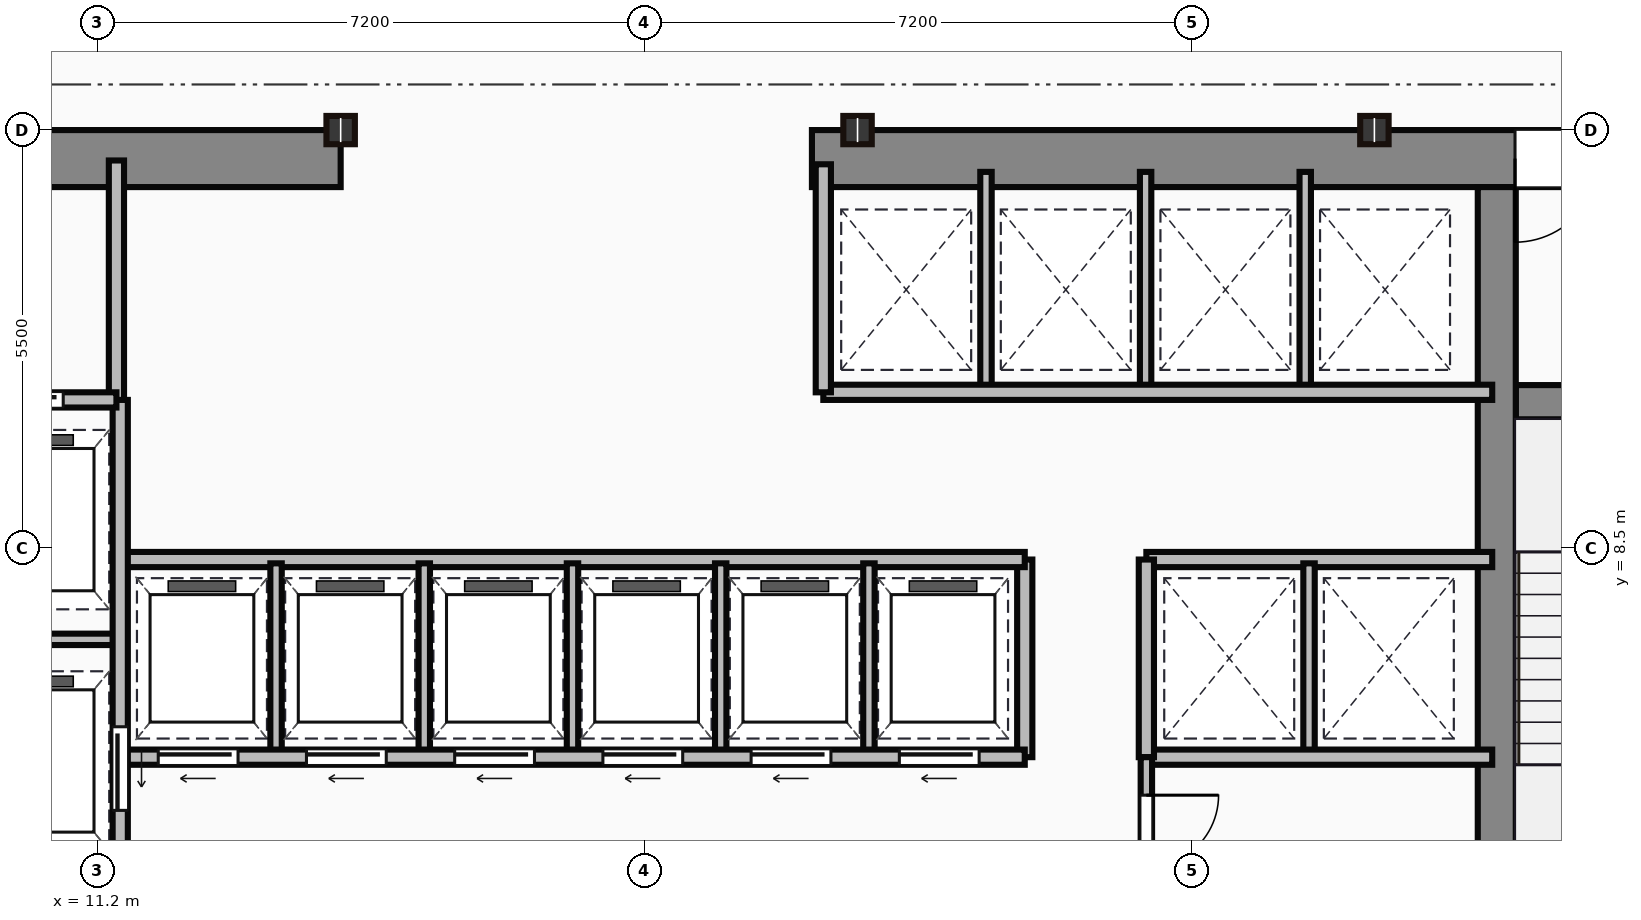
"""IFC4 building model, lengths in metres.
Left out: names, types, materials, properties, quantities, classifications, styles, units other than length and angle.
Written with IfcOpenShell. Run it as: python <this file> out.ifc"""

import sys

from ifc_helpers import new_model, si_unit, direction, frame, frame_2d, origin, origin_2d, place, context, subcontext, project, spatial, rectangle, i_section, extrude, source, transform, mapped, element, fill, save


model = new_model("IFC4")
c1 = context("Model", 3, precision=1e-05, world=origin(), true_north=direction((0.0, 1.0)))
c2 = subcontext(c1, "Body", "Model", "MODEL_VIEW")
j1 = project(units=[si_unit("LENGTHUNIT", "METRE"), si_unit("PLANEANGLEUNIT", "RADIAN")], contexts=[c1])
p1 = place(None, origin())
s1 = spatial("IfcSite", under=j1, at=p1, CompositionType="ELEMENT")
p2 = place(p1, origin())
s2 = spatial("IfcBuilding", under=s1, at=p2, CompositionType="ELEMENT")
p3 = place(p2, frame((0.0, 0.0, 173.45)))
s3 = spatial("IfcBuildingStorey", under=s2, at=p3, CompositionType="ELEMENT", Elevation=173.45)
m1 = source(origin(), c2, "Body", "SweptSolid", [
    extrude(rectangle(XDim=9.1, YDim=0.75, at=frame_2d((4.55, 0.0))), origin(), (0.0, 0.0, 1.0), 3.65),
])
p4 = place(p3, frame((5.3, 13.625, 0.0), z_axis=(0.0, 0.0, 1.0), x_axis=(1.0, 0.0, 0.0)))
e1 = element("IfcWall", 1, at=p4, inside=s3, PredefinedType="SHEAR", context=c2, shape_type="MappedRepresentation", body=[
    mapped(m1, transform((0.0, 0.0, 0.0))),
])
p5 = place(p4, frame((4.1, 0.0, 0.0)))
e2 = element("IfcOpeningElement", 2, at=p5, cuts=e1, PredefinedType="OPENING", context=c2, shape_type="SweptSolid", body=[
    extrude(rectangle(XDim=1.1, YDim=2.15, at=frame_2d((0.55, 1.075))), frame((0.0, 0.385, 0.0), z_axis=(0.0, -1.0, 0.0), x_axis=(1.0, 0.0, 0.0)), (0.0, 0.0, 1.0), 0.77),
])
m2 = source(origin(), c2, "Body", "SweptSolid", [
    extrude(rectangle(XDim=12.6, YDim=0.75, at=frame_2d((6.3, 0.0))), origin(), (0.0, 0.0, 1.0), 3.65),
])
p6 = place(p3, frame((20.6, 13.625, 0.0), z_axis=(0.0, 0.0, 1.0), x_axis=(1.0, 0.0, 0.0)))
e3 = element("IfcWall", 3, at=p6, inside=s3, PredefinedType="SHEAR", context=c2, shape_type="MappedRepresentation", body=[
    mapped(m2, transform((0.0, 0.0, 0.0))),
])
p7 = place(p6, frame((9.25, 0.0, 0.0)))
e4 = element("IfcOpeningElement", 4, at=p7, cuts=e3, PredefinedType="OPENING", context=c2, shape_type="SweptSolid", body=[
    extrude(rectangle(XDim=1.1, YDim=2.15, at=frame_2d((0.55, 1.075))), frame((0.0, 0.385, 0.0), z_axis=(0.0, -1.0, 0.0), x_axis=(1.0, 0.0, 0.0)), (0.0, 0.0, 1.0), 0.77),
])
m3 = source(origin(), c2, "Body", "SweptSolid", [
    extrude(rectangle(XDim=12.35, YDim=0.5, at=frame_2d((6.175, 0.0))), origin(), (0.0, 0.0, 1.0), 3.65),
])
p8 = place(p3, frame((29.61, 0.9, 0.0), z_axis=(0.0, 0.0, 1.0), x_axis=(0.0, 1.0, 0.0)))
e5 = element("IfcWall", 5, at=p8, inside=s3, PredefinedType="SHEAR", context=c2, shape_type="MappedRepresentation", body=[
    mapped(m3, transform((0.0, 0.0, 0.0))),
])
m4 = source(origin(), c2, "Body", "SweptSolid", [
    extrude(rectangle(XDim=3.39, YDim=0.45, at=frame_2d((1.695, 0.0))), origin(), (0.0, 0.0, 1.0), 3.65),
])
p9 = place(p3, frame((29.86, 10.42, 0.0), z_axis=(0.0, 0.0, 1.0), x_axis=(1.0, 0.0, 0.0)))
e6 = element("IfcWall", 6, at=p9, inside=s3, PredefinedType="SHEAR", context=c2, shape_type="MappedRepresentation", body=[
    mapped(m4, transform((0.0, 0.0, 0.0))),
])
p10 = place(p9, frame((1.1, 0.0, 0.0)))
e7 = element("IfcOpeningElement", 7, at=p10, cuts=e6, PredefinedType="OPENING", context=c2, shape_type="SweptSolid", body=[
    extrude(rectangle(XDim=1.1, YDim=2.15, at=frame_2d((0.55, 1.075))), frame((0.0, 0.235, 0.0), z_axis=(0.0, -1.0, 0.0), x_axis=(1.0, 0.0, 0.0)), (0.0, 0.0, 1.0), 0.47),
])
m5 = source(origin(), c2, "Body", "SweptSolid", [
    extrude(i_section(OverallWidth=0.374, OverallDepth=0.372, WebThickness=0.016, FlangeThickness=0.026, at=origin_2d()), origin(), (0.0, 0.0, 1.0), 3.65),
])
for number, where, z_axis, x_axis in (
    (8, (14.4, 14.0, 0.0), (0.0, 0.0, 1.0), (1.0, 0.0, 0.0)),
    (9, (21.2, 14.0, 0.0), (0.0, 0.0, 1.0), (1.0, 0.0, 0.0)),
    (10, (28.0, 14.0, 0.0), (0.0, 0.0, 1.0), (1.0, 0.0, 0.0)),
):
    element("IfcColumn", number, at=place(p3, frame(where, z_axis=z_axis, x_axis=x_axis)), inside=s3, PredefinedType="COLUMN", context=c2, shape_type="MappedRepresentation", body=[
        mapped(m5, transform((0.0, 0.0, 0.0))),
    ])
m6 = source(origin(), c2, "Body", "SweptSolid", [
    extrude(rectangle(XDim=3.18, YDim=0.2, at=frame_2d((1.59, 0.0))), origin(), (0.0, 0.0, 1.0), 3.4),
])
p11 = place(p3, frame((11.45, 10.42, 0.0), z_axis=(0.0, 0.0, 1.0), x_axis=(0.0, 1.0, 0.0)))
e11 = element("IfcWall", 11, at=p11, inside=s3, PredefinedType="PARTITIONING", context=c2, shape_type="MappedRepresentation", body=[
    mapped(m6, transform((0.0, 0.0, 0.0))),
])
m7 = source(origin(), c2, "Body", "SweptSolid", [
    extrude(rectangle(XDim=2.35, YDim=0.2, at=frame_2d((1.175, 0.0))), origin(), (0.0, 0.0, 1.0), 3.4),
])
p12 = place(p3, frame((9.1, 10.45, 0.0), z_axis=(0.0, 0.0, 1.0), x_axis=(1.0, 0.0, 0.0)))
e12 = element("IfcWall", 12, at=p12, inside=s3, PredefinedType="PARTITIONING", context=c2, shape_type="MappedRepresentation", body=[
    mapped(m7, transform((0.0, 0.0, 0.0))),
])
p13 = place(p12, frame((0.55, 0.0, 0.0)))
e13 = element("IfcOpeningElement", 13, at=p13, cuts=e12, PredefinedType="OPENING", context=c2, shape_type="SweptSolid", body=[
    extrude(rectangle(XDim=1.1, YDim=2.15, at=frame_2d((0.55, 1.075))), frame((0.0, 0.11, 0.0), z_axis=(0.0, -1.0, 0.0), x_axis=(1.0, 0.0, 0.0)), (0.0, 0.0, 1.0), 0.22),
])
m8 = source(origin(), c2, "Body", "SweptSolid", [
    extrude(rectangle(XDim=9.6, YDim=0.2, at=frame_2d((4.8, 0.0))), origin(), (0.0, 0.0, 1.0), 3.4),
])
p14 = place(p3, frame((11.5, 0.85, 0.0), z_axis=(0.0, 0.0, 1.0), x_axis=(0.0, 1.0, 0.0)))
e14 = element("IfcWall", 14, at=p14, inside=s3, PredefinedType="PARTITIONING", context=c2, shape_type="MappedRepresentation", body=[
    mapped(m8, transform((0.0, 0.0, 0.0))),
])
p15 = place(p14, frame((4.2, 0.0, 0.0)))
e15 = element("IfcOpeningElement", 15, at=p15, cuts=e14, PredefinedType="OPENING", context=c2, shape_type="SweptSolid", body=[
    extrude(rectangle(XDim=1.1, YDim=2.15, at=frame_2d((0.55, 1.075))), frame((0.0, 0.11, 0.0), z_axis=(0.0, -1.0, 0.0), x_axis=(1.0, 0.0, 0.0)), (0.0, 0.0, 1.0), 0.22),
])
p16 = place(p14, frame((0.9, 0.0, 0.0)))
e16 = element("IfcOpeningElement", 16, at=p16, cuts=e14, PredefinedType="OPENING", context=c2, shape_type="SweptSolid", body=[
    extrude(rectangle(XDim=1.2, YDim=2.15, at=frame_2d((0.6, 1.075))), frame((0.0, 0.11, 0.0), z_axis=(0.0, -1.0, 0.0), x_axis=(1.0, 0.0, 0.0)), (0.0, 0.0, 1.0), 0.22),
])
m9 = source(origin(), c2, "Body", "SweptSolid", [
    extrude(rectangle(XDim=2.4, YDim=0.15, at=frame_2d((1.2, 0.0))), origin(), (0.0, 0.0, 1.0), 3.4),
])
p17 = place(p3, frame((9.1, 7.3, 0.0), z_axis=(0.0, 0.0, 1.0), x_axis=(1.0, 0.0, 0.0)))
e17 = element("IfcWall", 17, at=p17, inside=s3, PredefinedType="PARTITIONING", context=c2, shape_type="MappedRepresentation", body=[
    mapped(m9, transform((0.0, 0.0, 0.0))),
])
m10 = source(origin(), c2, "Body", "SweptSolid", [
    extrude(rectangle(XDim=11.85, YDim=0.2, at=frame_2d((5.925, 0.0))), origin(), (0.0, 0.0, 1.0), 3.4),
])
p18 = place(p3, frame((11.55, 5.75, 0.0), z_axis=(0.0, 0.0, 1.0), x_axis=(1.0, 0.0, 0.0)))
e18 = element("IfcWall", 18, at=p18, inside=s3, PredefinedType="PARTITIONING", context=c2, shape_type="MappedRepresentation", body=[
    mapped(m10, transform((0.0, 0.0, 0.0))),
])
p19 = place(p18, frame((0.45, 0.0, 0.0)))
e19 = element("IfcOpeningElement", 19, at=p19, cuts=e18, PredefinedType="OPENING", context=c2, shape_type="SweptSolid", body=[
    extrude(rectangle(XDim=1.05, YDim=2.15, at=frame_2d((0.525, 1.075))), frame((0.0, 0.11, 0.0), z_axis=(0.0, -1.0, 0.0), x_axis=(1.0, 0.0, 0.0)), (0.0, 0.0, 1.0), 0.22),
])
p20 = place(p18, frame((2.4, 0.0, 0.0)))
e20 = element("IfcOpeningElement", 20, at=p20, cuts=e18, PredefinedType="OPENING", context=c2, shape_type="SweptSolid", body=[
    extrude(rectangle(XDim=1.05, YDim=2.15, at=frame_2d((0.525, 1.075))), frame((0.0, 0.11, 0.0), z_axis=(0.0, -1.0, 0.0), x_axis=(1.0, 0.0, 0.0)), (0.0, 0.0, 1.0), 0.22),
])
p21 = place(p18, frame((4.35, 0.0, 0.0)))
e21 = element("IfcOpeningElement", 21, at=p21, cuts=e18, PredefinedType="OPENING", context=c2, shape_type="SweptSolid", body=[
    extrude(rectangle(XDim=1.05, YDim=2.15, at=frame_2d((0.525, 1.075))), frame((0.0, 0.11, 0.0), z_axis=(0.0, -1.0, 0.0), x_axis=(1.0, 0.0, 0.0)), (0.0, 0.0, 1.0), 0.22),
])
p22 = place(p18, frame((6.3, 0.0, 0.0)))
e22 = element("IfcOpeningElement", 22, at=p22, cuts=e18, PredefinedType="OPENING", context=c2, shape_type="SweptSolid", body=[
    extrude(rectangle(XDim=1.05, YDim=2.15, at=frame_2d((0.525, 1.075))), frame((0.0, 0.11, 0.0), z_axis=(0.0, -1.0, 0.0), x_axis=(1.0, 0.0, 0.0)), (0.0, 0.0, 1.0), 0.22),
])
p23 = place(p18, frame((8.25, 0.0, 0.0)))
e23 = element("IfcOpeningElement", 23, at=p23, cuts=e18, PredefinedType="OPENING", context=c2, shape_type="SweptSolid", body=[
    extrude(rectangle(XDim=1.05, YDim=2.15, at=frame_2d((0.525, 1.075))), frame((0.0, 0.11, 0.0), z_axis=(0.0, -1.0, 0.0), x_axis=(1.0, 0.0, 0.0)), (0.0, 0.0, 1.0), 0.22),
])
p24 = place(p18, frame((10.2, 0.0, 0.0)))
e24 = element("IfcOpeningElement", 24, at=p24, cuts=e18, PredefinedType="OPENING", context=c2, shape_type="SweptSolid", body=[
    extrude(rectangle(XDim=1.05, YDim=2.15, at=frame_2d((0.525, 1.075))), frame((0.0, 0.11, 0.0), z_axis=(0.0, -1.0, 0.0), x_axis=(1.0, 0.0, 0.0)), (0.0, 0.0, 1.0), 0.22),
])
p25 = place(p3, frame((11.55, 8.35, 0.0), z_axis=(0.0, 0.0, 1.0), x_axis=(1.0, 0.0, 0.0)))
e25 = element("IfcWall", 25, at=p25, inside=s3, PredefinedType="PARTITIONING", context=c2, shape_type="MappedRepresentation", body=[
    mapped(m10, transform((0.0, 0.0, 0.0))),
])
m11 = source(origin(), c2, "Body", "SweptSolid", [
    extrude(rectangle(XDim=2.6, YDim=0.2, at=frame_2d((1.3, 0.0))), origin(), (0.0, 0.0, 1.0), 3.4),
])
p26 = place(p3, frame((23.4, 5.75, 0.0), z_axis=(0.0, 0.0, 1.0), x_axis=(0.0, 1.0, 0.0)))
e26 = element("IfcWall", 26, at=p26, inside=s3, PredefinedType="PARTITIONING", context=c2, shape_type="MappedRepresentation", body=[
    mapped(m11, transform((0.0, 0.0, 0.0))),
])
m12 = source(origin(), c2, "Body", "SweptSolid", [
    extrude(rectangle(XDim=2.5, YDim=0.15, at=frame_2d((1.25, 0.0))), origin(), (0.0, 0.0, 1.0), 3.4),
])
for number, where, z_axis, x_axis in (
    (27, (13.55, 5.8, 0.0), (0.0, 0.0, 1.0), (0.0, 1.0, 0.0)),
    (28, (15.5, 5.8, 0.0), (0.0, 0.0, 1.0), (0.0, 1.0, 0.0)),
    (29, (17.45, 5.8, 0.0), (0.0, 0.0, 1.0), (0.0, 1.0, 0.0)),
    (30, (19.4, 5.8, 0.0), (0.0, 0.0, 1.0), (0.0, 1.0, 0.0)),
    (31, (21.35, 5.8, 0.0), (0.0, 0.0, 1.0), (0.0, 1.0, 0.0)),
):
    element("IfcWall", number, at=place(p3, frame(where, z_axis=z_axis, x_axis=x_axis)), inside=s3, PredefinedType="PARTITIONING", context=c2, shape_type="MappedRepresentation", body=[
        mapped(m12, transform((0.0, 0.0, 0.0))),
    ])
m13 = source(origin(), c2, "Body", "SweptSolid", [
    extrude(rectangle(XDim=8.8, YDim=0.2, at=frame_2d((4.4, 0.0))), origin(), (0.0, 0.0, 1.0), 3.4),
])
p27 = place(p3, frame((20.75, 10.55, 0.0), z_axis=(0.0, 0.0, 1.0), x_axis=(1.0, 0.0, 0.0)))
e32 = element("IfcWall", 32, at=p27, inside=s3, PredefinedType="PARTITIONING", context=c2, shape_type="MappedRepresentation", body=[
    mapped(m13, transform((0.0, 0.0, 0.0))),
])
m14 = source(origin(), c2, "Body", "SweptSolid", [
    extrude(rectangle(XDim=3.0, YDim=0.2, at=frame_2d((1.5, 0.0))), origin(), (0.0, 0.0, 1.0), 3.4),
])
p28 = place(p3, frame((20.75, 10.55, 0.0), z_axis=(0.0, 0.0, 1.0), x_axis=(0.0, 1.0, 0.0)))
e33 = element("IfcWall", 33, at=p28, inside=s3, PredefinedType="PARTITIONING", context=c2, shape_type="MappedRepresentation", body=[
    mapped(m14, transform((0.0, 0.0, 0.0))),
])
m15 = source(origin(), c2, "Body", "SweptSolid", [
    extrude(rectangle(XDim=2.85, YDim=0.15, at=frame_2d((1.425, 0.0))), origin(), (0.0, 0.0, 1.0), 3.4),
])
for number, where, z_axis, x_axis in (
    (34, (22.89, 10.6, 0.0), (0.0, 0.0, 1.0), (0.0, 1.0, 0.0)),
    (35, (24.99, 10.6, 0.0), (0.0, 0.0, 1.0), (0.0, 1.0, 0.0)),
    (36, (27.09, 10.6, 0.0), (0.0, 0.0, 1.0), (0.0, 1.0, 0.0)),
):
    element("IfcWall", number, at=place(p3, frame(where, z_axis=z_axis, x_axis=x_axis)), inside=s3, PredefinedType="PARTITIONING", context=c2, shape_type="MappedRepresentation", body=[
        mapped(m15, transform((0.0, 0.0, 0.0))),
    ])
m16 = source(origin(), c2, "Body", "SweptSolid", [
    extrude(rectangle(XDim=4.55, YDim=0.2, at=frame_2d((2.275, 0.0))), origin(), (0.0, 0.0, 1.0), 3.4),
])
for number, where, z_axis, x_axis in (
    (37, (25.0, 8.35, 0.0), (0.0, 0.0, 1.0), (1.0, 0.0, 0.0)),
    (38, (25.0, 5.75, 0.0), (0.0, 0.0, 1.0), (1.0, 0.0, 0.0)),
):
    element("IfcWall", number, at=place(p3, frame(where, z_axis=z_axis, x_axis=x_axis)), inside=s3, PredefinedType="PARTITIONING", context=c2, shape_type="MappedRepresentation", body=[
        mapped(m16, transform((0.0, 0.0, 0.0))),
    ])
p29 = place(p3, frame((25.0, 5.75, 0.0), z_axis=(0.0, 0.0, 1.0), x_axis=(0.0, 1.0, 0.0)))
e39 = element("IfcWall", 39, at=p29, inside=s3, PredefinedType="PARTITIONING", context=c2, shape_type="MappedRepresentation", body=[
    mapped(m11, transform((0.0, 0.0, 0.0))),
])
p30 = place(p3, frame((27.14, 5.8, 0.0), z_axis=(0.0, 0.0, 1.0), x_axis=(0.0, 1.0, 0.0)))
e40 = element("IfcWall", 40, at=p30, inside=s3, PredefinedType="PARTITIONING", context=c2, shape_type="MappedRepresentation", body=[
    mapped(m12, transform((0.0, 0.0, 0.0))),
])
m17 = source(origin(), c2, "Body", "SweptSolid", [
    extrude(rectangle(XDim=4.9, YDim=0.15, at=frame_2d((2.45, 0.0))), origin(), (0.0, 0.0, 1.0), 3.4),
])
p31 = place(p3, frame((25.0, 0.85, 0.0), z_axis=(0.0, 0.0, 1.0), x_axis=(0.0, 1.0, 0.0)))
e41 = element("IfcWall", 41, at=p31, inside=s3, PredefinedType="PARTITIONING", context=c2, shape_type="MappedRepresentation", body=[
    mapped(m17, transform((0.0, 0.0, 0.0))),
])
p32 = place(p31, frame((1.8, 0.0, 0.0)))
e42 = element("IfcOpeningElement", 42, at=p32, cuts=e41, PredefinedType="OPENING", context=c2, shape_type="SweptSolid", body=[
    extrude(rectangle(XDim=0.95, YDim=2.15, at=frame_2d((0.475, 1.075))), frame((0.0, 0.085, 0.0), z_axis=(0.0, -1.0, 0.0), x_axis=(1.0, 0.0, 0.0)), (0.0, 0.0, 1.0), 0.17),
])
p33 = place(p31, frame((3.45, 0.0, 0.0)))
e43 = element("IfcOpeningElement", 43, at=p33, cuts=e41, PredefinedType="OPENING", context=c2, shape_type="SweptSolid", body=[
    extrude(rectangle(XDim=0.95, YDim=2.15, at=frame_2d((0.475, 1.075))), frame((0.0, 0.085, 0.0), z_axis=(0.0, -1.0, 0.0), x_axis=(1.0, 0.0, 0.0)), (0.0, 0.0, 1.0), 0.17),
])
m18 = source(origin(), c2, "Body", "SweptSolid", [
    extrude(rectangle(XDim=1.1, YDim=2.15, at=frame_2d((0.55, 1.075))), frame((0.0, 0.025, 0.0), z_axis=(0.0, -1.0, 0.0), x_axis=(1.0, 0.0, 0.0)), (0.0, 0.0, 1.0), 0.05),
])
p34 = place(p7, origin())
e44 = element("IfcDoor", 44, at=p34, inside=s3, OperationType="SINGLE_SWING_LEFT", PredefinedType="DOOR", context=c2, shape_type="MappedRepresentation", body=[
    mapped(m18, transform((0.0, 0.0, 0.0))),
])
fill(e4, e44)
p35 = place(p13, origin())
e45 = element("IfcDoor", 45, at=p35, inside=s3, OperationType="SLIDING_TO_LEFT", PredefinedType="DOOR", context=c2, shape_type="MappedRepresentation", body=[
    mapped(m18, transform((0.0, 0.0, 0.0))),
])
fill(e13, e45)
p36 = place(p15, frame((1.1, 0.0, 0.0), z_axis=(0.0, 0.0, 1.0), x_axis=(-1.0, 0.0, 0.0)))
e46 = element("IfcDoor", 46, at=p36, inside=s3, OperationType="SLIDING_TO_LEFT", PredefinedType="DOOR", context=c2, shape_type="MappedRepresentation", body=[
    mapped(m18, transform((0.0, 0.0, 0.0))),
])
fill(e15, e46)
m19 = source(origin(), c2, "Body", "SweptSolid", [
    extrude(rectangle(XDim=1.05, YDim=2.15, at=frame_2d((0.525, 1.075))), frame((0.0, 0.025, 0.0), z_axis=(0.0, -1.0, 0.0), x_axis=(1.0, 0.0, 0.0)), (0.0, 0.0, 1.0), 0.05),
])
p37 = place(p19, frame((1.05, 0.0, 0.0), z_axis=(0.0, 0.0, 1.0), x_axis=(-1.0, 0.0, 0.0)))
e47 = element("IfcDoor", 47, at=p37, inside=s3, OperationType="SLIDING_TO_LEFT", PredefinedType="DOOR", context=c2, shape_type="MappedRepresentation", body=[
    mapped(m19, transform((0.0, 0.0, 0.0))),
])
fill(e19, e47)
p38 = place(p20, frame((1.05, 0.0, 0.0), z_axis=(0.0, 0.0, 1.0), x_axis=(-1.0, 0.0, 0.0)))
e48 = element("IfcDoor", 48, at=p38, inside=s3, OperationType="SLIDING_TO_LEFT", PredefinedType="DOOR", context=c2, shape_type="MappedRepresentation", body=[
    mapped(m19, transform((0.0, 0.0, 0.0))),
])
fill(e20, e48)
p39 = place(p21, frame((1.05, 0.0, 0.0), z_axis=(0.0, 0.0, 1.0), x_axis=(-1.0, 0.0, 0.0)))
e49 = element("IfcDoor", 49, at=p39, inside=s3, OperationType="SLIDING_TO_LEFT", PredefinedType="DOOR", context=c2, shape_type="MappedRepresentation", body=[
    mapped(m19, transform((0.0, 0.0, 0.0))),
])
fill(e21, e49)
p40 = place(p22, frame((1.05, 0.0, 0.0), z_axis=(0.0, 0.0, 1.0), x_axis=(-1.0, 0.0, 0.0)))
e50 = element("IfcDoor", 50, at=p40, inside=s3, OperationType="SLIDING_TO_LEFT", PredefinedType="DOOR", context=c2, shape_type="MappedRepresentation", body=[
    mapped(m19, transform((0.0, 0.0, 0.0))),
])
fill(e22, e50)
p41 = place(p23, frame((1.05, 0.0, 0.0), z_axis=(0.0, 0.0, 1.0), x_axis=(-1.0, 0.0, 0.0)))
e51 = element("IfcDoor", 51, at=p41, inside=s3, OperationType="SLIDING_TO_LEFT", PredefinedType="DOOR", context=c2, shape_type="MappedRepresentation", body=[
    mapped(m19, transform((0.0, 0.0, 0.0))),
])
fill(e23, e51)
p42 = place(p24, frame((1.05, 0.0, 0.0), z_axis=(0.0, 0.0, 1.0), x_axis=(-1.0, 0.0, 0.0)))
e52 = element("IfcDoor", 52, at=p42, inside=s3, OperationType="SLIDING_TO_LEFT", PredefinedType="DOOR", context=c2, shape_type="MappedRepresentation", body=[
    mapped(m19, transform((0.0, 0.0, 0.0))),
])
fill(e24, e52)
m20 = source(origin(), c2, "Body", "SweptSolid", [
    extrude(rectangle(XDim=0.95, YDim=2.15, at=frame_2d((0.475, 1.075))), frame((0.0, 0.025, 0.0), z_axis=(0.0, -1.0, 0.0), x_axis=(1.0, 0.0, 0.0)), (0.0, 0.0, 1.0), 0.05),
])
p43 = place(p33, origin())
e53 = element("IfcDoor", 53, at=p43, inside=s3, OperationType="SINGLE_SWING_RIGHT", PredefinedType="DOOR", context=c2, shape_type="MappedRepresentation", body=[
    mapped(m20, transform((0.0, 0.0, 0.0))),
])
fill(e43, e53)
save(model, sys.argv[1])
